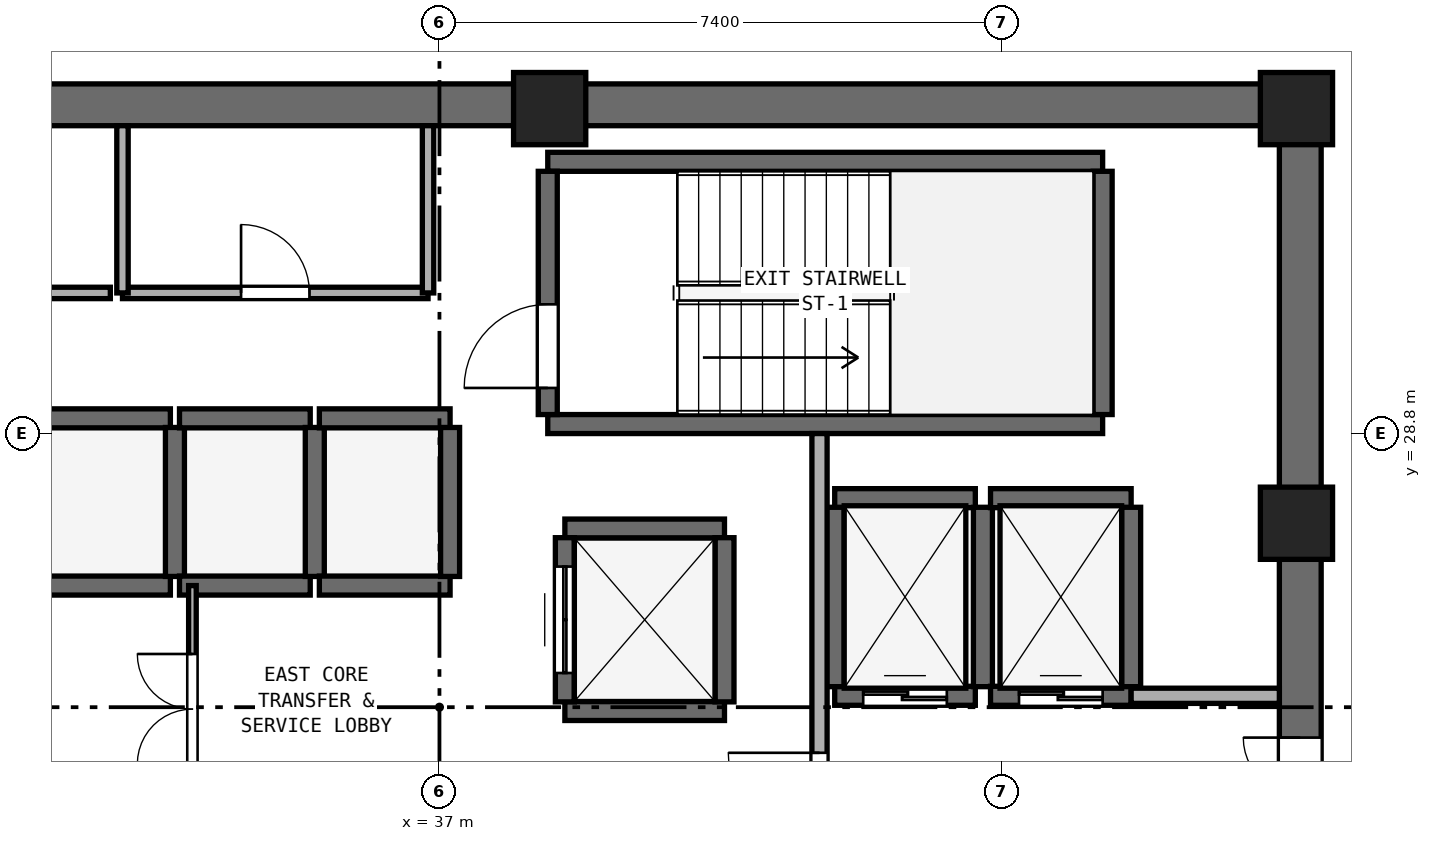
"""IFC4 building model, lengths in metres.
Left out: names, types, materials, properties, quantities, classifications, styles, units other than length and angle.
Written with IfcOpenShell. Run it as: python <this file> out.ifc"""

import sys

from ifc_helpers import new_model, si_unit, direction, frame, frame_2d, origin, origin_2d, place, context, subcontext, project, spatial, rectangle, extrude, element, fill, save


model = new_model("IFC4")
c1 = context("Model", 3, precision=1e-05, world=origin(), true_north=direction((0.0, 1.0)))
c2 = subcontext(c1, "Body", "Model", "MODEL_VIEW")
j1 = project(units=[si_unit("LENGTHUNIT", "METRE"), si_unit("PLANEANGLEUNIT", "RADIAN")], contexts=[c1])
p1 = place(None, origin())
s1 = spatial("IfcSite", under=j1, at=p1, CompositionType="ELEMENT")
p2 = place(p1, origin())
s2 = spatial("IfcBuilding", under=s1, at=p2, CompositionType="ELEMENT")
p3 = place(p2, frame((0.0, 0.0, 140.2)))
s3 = spatial("IfcBuildingStorey", under=s2, at=p3, CompositionType="ELEMENT", Elevation=140.2)
p4 = place(p3, frame((25.4, 33.125, 0.0), z_axis=(0.0, 0.0, 1.0), x_axis=(1.0, 0.0, 0.0)))
e1 = element("IfcWall", 1, at=p4, inside=s3, PredefinedType="SHEAR", context=c2, shape_type="SweptSolid", body=[
    extrude(rectangle(XDim=23.2, YDim=0.55, at=frame_2d((11.6, 0.0))), origin(), (0.0, 0.0, 1.0), 3.54),
])
p5 = place(p3, frame((48.325, 17.55, 0.0), z_axis=(0.0, 0.0, 1.0), x_axis=(0.0, 1.0, 0.0)))
e2 = element("IfcWall", 2, at=p5, inside=s3, PredefinedType="SHEAR", context=c2, shape_type="SweptSolid", body=[
    extrude(rectangle(XDim=15.3, YDim=0.55, at=frame_2d((7.65, 0.0))), origin(), (0.0, 0.0, 1.0), 3.54),
])
p6 = place(p5, frame((5.75, 0.0, 0.0)))
e3 = element("IfcOpeningElement", 3, at=p6, cuts=e2, PredefinedType="OPENING", context=c2, shape_type="SweptSolid", body=[
    extrude(rectangle(XDim=1.5, YDim=2.15, at=frame_2d((0.75, 1.075))), frame((0.0, 0.285, 0.0), z_axis=(0.0, -1.0, 0.0), x_axis=(1.0, 0.0, 0.0)), (0.0, 0.0, 1.0), 0.57),
])
for number, where, z_axis, x_axis in (
    (4, (48.275, 27.62, 0.0), (0.0, 0.0, 1.0), (1.0, 0.0, 0.0)),
    (5, (48.275, 33.075, 0.0), (0.0, 0.0, 1.0), (1.0, 0.0, 0.0)),
    (6, (38.45, 33.075, 0.0), (0.0, 0.0, 1.0), (1.0, 0.0, 0.0)),
):
    element("IfcColumn", number, at=place(p3, frame(where, z_axis=z_axis, x_axis=x_axis)), inside=s3, PredefinedType="PILASTER", context=c2, shape_type="SweptSolid", body=[
        extrude(rectangle(XDim=0.95, YDim=0.95, at=origin_2d()), origin(), (0.0, 0.0, 1.0), 3.8),
    ])
for number, where, z_axis, x_axis in (
    (7, (38.425, 28.925, 0.0), (0.0, 0.0, 1.0), (1.0, 0.0, 0.0)),
    (8, (38.425, 32.375, 0.0), (0.0, 0.0, 1.0), (1.0, 0.0, 0.0)),
):
    element("IfcWall", number, at=place(p3, frame(where, z_axis=z_axis, x_axis=x_axis)), inside=s3, PredefinedType="SHEAR", context=c2, shape_type="SweptSolid", body=[
        extrude(rectangle(XDim=7.3, YDim=0.25, at=frame_2d((3.65, 0.0))), origin(), (0.0, 0.0, 1.0), 3.54),
    ])
p7 = place(p3, frame((38.425, 29.05, 0.0), z_axis=(0.0, 0.0, 1.0), x_axis=(0.0, 1.0, 0.0)))
e9 = element("IfcWall", 9, at=p7, inside=s3, PredefinedType="SHEAR", context=c2, shape_type="SweptSolid", body=[
    extrude(rectangle(XDim=3.2, YDim=0.25, at=frame_2d((1.6, 0.0))), origin(), (0.0, 0.0, 1.0), 3.54),
])
p8 = place(p7, frame((0.35, 0.0, 0.0)))
e10 = element("IfcOpeningElement", 10, at=p8, cuts=e9, PredefinedType="OPENING", context=c2, shape_type="SweptSolid", body=[
    extrude(rectangle(XDim=1.1, YDim=2.15, at=frame_2d((0.55, 1.075))), frame((0.0, 0.135, 0.0), z_axis=(0.0, -1.0, 0.0), x_axis=(1.0, 0.0, 0.0)), (0.0, 0.0, 1.0), 0.27),
])
p9 = place(p3, frame((45.725, 29.05, 0.0), z_axis=(0.0, 0.0, 1.0), x_axis=(0.0, 1.0, 0.0)))
e11 = element("IfcWall", 11, at=p9, inside=s3, PredefinedType="SHEAR", context=c2, shape_type="SweptSolid", body=[
    extrude(rectangle(XDim=3.2, YDim=0.25, at=frame_2d((1.6, 0.0))), origin(), (0.0, 0.0, 1.0), 3.54),
])
for number, where, z_axis, x_axis in (
    (12, (31.74, 26.8, 0.0), (0.0, 0.0, 1.0), (1.0, 0.0, 0.0)),
    (13, (31.74, 29.0, 0.0), (0.0, 0.0, 1.0), (1.0, 0.0, 0.0)),
):
    element("IfcWall", number, at=place(p3, frame(where, z_axis=z_axis, x_axis=x_axis)), inside=s3, PredefinedType="SHEAR", context=c2, shape_type="SweptSolid", body=[
        extrude(rectangle(XDim=1.72, YDim=0.25, at=frame_2d((0.86, 0.0))), origin(), (0.0, 0.0, 1.0), 3.54),
    ])
p10 = place(p3, frame((33.52, 26.92, 0.0), z_axis=(0.0, 0.0, 1.0), x_axis=(0.0, 1.0, 0.0)))
e14 = element("IfcWall", 14, at=p10, inside=s3, PredefinedType="SHEAR", context=c2, shape_type="SweptSolid", body=[
    extrude(rectangle(XDim=1.96, YDim=0.25, at=frame_2d((0.98, 0.0))), origin(), (0.0, 0.0, 1.0), 3.54),
])
for number, where, z_axis, x_axis in (
    (15, (33.58, 26.8, 0.0), (0.0, 0.0, 1.0), (1.0, 0.0, 0.0)),
    (16, (33.58, 29.0, 0.0), (0.0, 0.0, 1.0), (1.0, 0.0, 0.0)),
):
    element("IfcWall", number, at=place(p3, frame(where, z_axis=z_axis, x_axis=x_axis)), inside=s3, PredefinedType="SHEAR", context=c2, shape_type="SweptSolid", body=[
        extrude(rectangle(XDim=1.72, YDim=0.25, at=frame_2d((0.86, 0.0))), origin(), (0.0, 0.0, 1.0), 3.54),
    ])
p11 = place(p3, frame((35.36, 26.92, 0.0), z_axis=(0.0, 0.0, 1.0), x_axis=(0.0, 1.0, 0.0)))
e17 = element("IfcWall", 17, at=p11, inside=s3, PredefinedType="SHEAR", context=c2, shape_type="SweptSolid", body=[
    extrude(rectangle(XDim=1.96, YDim=0.25, at=frame_2d((0.98, 0.0))), origin(), (0.0, 0.0, 1.0), 3.54),
])
for number, where, z_axis, x_axis in (
    (18, (35.42, 26.8, 0.0), (0.0, 0.0, 1.0), (1.0, 0.0, 0.0)),
    (19, (35.42, 29.0, 0.0), (0.0, 0.0, 1.0), (1.0, 0.0, 0.0)),
):
    element("IfcWall", number, at=place(p3, frame(where, z_axis=z_axis, x_axis=x_axis)), inside=s3, PredefinedType="SHEAR", context=c2, shape_type="SweptSolid", body=[
        extrude(rectangle(XDim=1.72, YDim=0.25, at=frame_2d((0.86, 0.0))), origin(), (0.0, 0.0, 1.0), 3.54),
    ])
p12 = place(p3, frame((37.14, 26.92, 0.0), z_axis=(0.0, 0.0, 1.0), x_axis=(0.0, 1.0, 0.0)))
e20 = element("IfcWall", 20, at=p12, inside=s3, PredefinedType="SHEAR", context=c2, shape_type="SweptSolid", body=[
    extrude(rectangle(XDim=1.96, YDim=0.25, at=frame_2d((0.98, 0.0))), origin(), (0.0, 0.0, 1.0), 3.54),
])
p13 = place(p3, frame((42.2, 25.35, 0.0), z_axis=(0.0, 0.0, 1.0), x_axis=(1.0, 0.0, 0.0)))
e21 = element("IfcWall", 21, at=p13, inside=s3, PredefinedType="SHEAR", context=c2, shape_type="SweptSolid", body=[
    extrude(rectangle(XDim=1.85, YDim=0.25, at=frame_2d((0.925, 0.0))), origin(), (0.0, 0.0, 1.0), 3.54),
])
p14 = place(p13, frame((0.375, 0.0, 0.0)))
e22 = element("IfcOpeningElement", 22, at=p14, cuts=e21, PredefinedType="OPENING", context=c2, shape_type="SweptSolid", body=[
    extrude(rectangle(XDim=1.1, YDim=2.15, at=frame_2d((0.55, 1.075))), frame((0.0, 0.135, 0.0), z_axis=(0.0, -1.0, 0.0), x_axis=(1.0, 0.0, 0.0)), (0.0, 0.0, 1.0), 0.27),
])
p15 = place(p3, frame((42.2, 27.95, 0.0), z_axis=(0.0, 0.0, 1.0), x_axis=(1.0, 0.0, 0.0)))
e23 = element("IfcWall", 23, at=p15, inside=s3, PredefinedType="SHEAR", context=c2, shape_type="SweptSolid", body=[
    extrude(rectangle(XDim=1.85, YDim=0.25, at=frame_2d((0.925, 0.0))), origin(), (0.0, 0.0, 1.0), 3.54),
])
for number, where, z_axis, x_axis in (
    (24, (42.2, 25.47, 0.0), (0.0, 0.0, 1.0), (0.0, 1.0, 0.0)),
    (25, (44.15, 25.47, 0.0), (0.0, 0.0, 1.0), (0.0, 1.0, 0.0)),
):
    element("IfcWall", number, at=place(p3, frame(where, z_axis=z_axis, x_axis=x_axis)), inside=s3, PredefinedType="SHEAR", context=c2, shape_type="SweptSolid", body=[
        extrude(rectangle(XDim=2.36, YDim=0.25, at=frame_2d((1.18, 0.0))), origin(), (0.0, 0.0, 1.0), 3.54),
    ])
p16 = place(p3, frame((44.25, 25.35, 0.0), z_axis=(0.0, 0.0, 1.0), x_axis=(1.0, 0.0, 0.0)))
e26 = element("IfcWall", 26, at=p16, inside=s3, PredefinedType="SHEAR", context=c2, shape_type="SweptSolid", body=[
    extrude(rectangle(XDim=1.85, YDim=0.25, at=frame_2d((0.925, 0.0))), origin(), (0.0, 0.0, 1.0), 3.54),
])
p17 = place(p16, frame((0.375, 0.0, 0.0)))
e27 = element("IfcOpeningElement", 27, at=p17, cuts=e26, PredefinedType="OPENING", context=c2, shape_type="SweptSolid", body=[
    extrude(rectangle(XDim=1.1, YDim=2.15, at=frame_2d((0.55, 1.075))), frame((0.0, 0.135, 0.0), z_axis=(0.0, -1.0, 0.0), x_axis=(1.0, 0.0, 0.0)), (0.0, 0.0, 1.0), 0.27),
])
p18 = place(p3, frame((44.25, 27.95, 0.0), z_axis=(0.0, 0.0, 1.0), x_axis=(1.0, 0.0, 0.0)))
e28 = element("IfcWall", 28, at=p18, inside=s3, PredefinedType="SHEAR", context=c2, shape_type="SweptSolid", body=[
    extrude(rectangle(XDim=1.85, YDim=0.25, at=frame_2d((0.925, 0.0))), origin(), (0.0, 0.0, 1.0), 3.54),
])
p19 = place(p3, frame((46.1, 25.47, 0.0), z_axis=(0.0, 0.0, 1.0), x_axis=(0.0, 1.0, 0.0)))
e29 = element("IfcWall", 29, at=p19, inside=s3, PredefinedType="SHEAR", context=c2, shape_type="SweptSolid", body=[
    extrude(rectangle(XDim=2.36, YDim=0.25, at=frame_2d((1.18, 0.0))), origin(), (0.0, 0.0, 1.0), 3.54),
])
for number, where, z_axis, x_axis in (
    (30, (38.65, 25.15, 0.0), (0.0, 0.0, 1.0), (1.0, 0.0, 0.0)),
    (31, (38.65, 27.55, 0.0), (0.0, 0.0, 1.0), (1.0, 0.0, 0.0)),
):
    element("IfcWall", number, at=place(p3, frame(where, z_axis=z_axis, x_axis=x_axis)), inside=s3, PredefinedType="SHEAR", context=c2, shape_type="SweptSolid", body=[
        extrude(rectangle(XDim=2.1, YDim=0.25, at=frame_2d((1.05, 0.0))), origin(), (0.0, 0.0, 1.0), 3.54),
    ])
p20 = place(p3, frame((38.65, 25.27, 0.0), z_axis=(0.0, 0.0, 1.0), x_axis=(0.0, 1.0, 0.0)))
e32 = element("IfcWall", 32, at=p20, inside=s3, PredefinedType="SHEAR", context=c2, shape_type="SweptSolid", body=[
    extrude(rectangle(XDim=2.16, YDim=0.25, at=frame_2d((1.08, 0.0))), origin(), (0.0, 0.0, 1.0), 3.54),
])
p21 = place(p20, frame((0.38, 0.0, 0.0)))
e33 = element("IfcOpeningElement", 33, at=p21, cuts=e32, PredefinedType="OPENING", context=c2, shape_type="SweptSolid", body=[
    extrude(rectangle(XDim=1.4, YDim=2.2, at=frame_2d((0.7, 1.1))), frame((0.0, 0.135, 0.0), z_axis=(0.0, -1.0, 0.0), x_axis=(1.0, 0.0, 0.0)), (0.0, 0.0, 1.0), 0.27),
])
p22 = place(p3, frame((40.75, 25.27, 0.0), z_axis=(0.0, 0.0, 1.0), x_axis=(0.0, 1.0, 0.0)))
e34 = element("IfcWall", 34, at=p22, inside=s3, PredefinedType="SHEAR", context=c2, shape_type="SweptSolid", body=[
    extrude(rectangle(XDim=2.16, YDim=0.25, at=frame_2d((1.08, 0.0))), origin(), (0.0, 0.0, 1.0), 3.54),
])
p23 = place(p3, frame((42.0, 22.75, 0.0), z_axis=(0.0, 0.0, 1.0), x_axis=(0.0, 1.0, 0.0)))
e35 = element("IfcWall", 35, at=p23, inside=s3, PredefinedType="SOLIDWALL", context=c2, shape_type="SweptSolid", body=[
    extrude(rectangle(XDim=6.05, YDim=0.2, at=frame_2d((3.025, 0.0))), origin(), (0.0, 0.0, 1.0), 3.54),
])
p24 = place(p23, frame((0.65, 0.0, 0.0)))
e36 = element("IfcOpeningElement", 36, at=p24, cuts=e35, PredefinedType="OPENING", context=c2, shape_type="SweptSolid", body=[
    extrude(rectangle(XDim=1.2, YDim=2.15, at=frame_2d((0.6, 1.075))), frame((0.0, 0.11, 0.0), z_axis=(0.0, -1.0, 0.0), x_axis=(1.0, 0.0, 0.0)), (0.0, 0.0, 1.0), 0.22),
])
p25 = place(p3, frame((46.1, 25.35, 0.0), z_axis=(0.0, 0.0, 1.0), x_axis=(1.0, 0.0, 0.0)))
e37 = element("IfcWall", 37, at=p25, inside=s3, PredefinedType="SOLIDWALL", context=c2, shape_type="SweptSolid", body=[
    extrude(rectangle(XDim=1.95, YDim=0.2, at=frame_2d((0.975, 0.0))), origin(), (0.0, 0.0, 1.0), 3.54),
])
p26 = place(p3, frame((29.43, 30.65, 0.0), z_axis=(0.0, 0.0, 1.0), x_axis=(1.0, 0.0, 0.0)))
e38 = element("IfcWall", 38, at=p26, inside=s3, PredefinedType="PARTITIONING", context=c2, shape_type="SweptSolid", body=[
    extrude(rectangle(XDim=3.24, YDim=0.15, at=frame_2d((1.62, 0.0))), origin(), (0.0, 0.0, 1.0), 3.54),
])
p27 = place(p26, frame((1.145, 0.0, 0.0)))
e39 = element("IfcOpeningElement", 39, at=p27, cuts=e38, PredefinedType="OPENING", context=c2, shape_type="SweptSolid", body=[
    extrude(rectangle(XDim=0.95, YDim=2.1, at=frame_2d((0.475, 1.05))), frame((0.0, 0.085, 0.0), z_axis=(0.0, -1.0, 0.0), x_axis=(1.0, 0.0, 0.0)), (0.0, 0.0, 1.0), 0.17),
])
p28 = place(p3, frame((32.83, 30.65, 0.0), z_axis=(0.0, 0.0, 1.0), x_axis=(1.0, 0.0, 0.0)))
e40 = element("IfcWall", 40, at=p28, inside=s3, PredefinedType="PARTITIONING", context=c2, shape_type="SweptSolid", body=[
    extrude(rectangle(XDim=4.02, YDim=0.15, at=frame_2d((2.01, 0.0))), origin(), (0.0, 0.0, 1.0), 3.54),
])
p29 = place(p28, frame((1.56, 0.0, 0.0)))
e41 = element("IfcOpeningElement", 41, at=p29, cuts=e40, PredefinedType="OPENING", context=c2, shape_type="SweptSolid", body=[
    extrude(rectangle(XDim=0.9, YDim=2.1, at=frame_2d((0.45, 1.05))), frame((0.0, 0.085, 0.0), z_axis=(0.0, -1.0, 0.0), x_axis=(1.0, 0.0, 0.0)), (0.0, 0.0, 1.0), 0.17),
])
for number, where, z_axis, x_axis in (
    (42, (32.83, 30.65, 0.0), (0.0, 0.0, 1.0), (0.0, 1.0, 0.0)),
    (43, (36.85, 30.65, 0.0), (0.0, 0.0, 1.0), (0.0, 1.0, 0.0)),
):
    element("IfcWall", number, at=place(p3, frame(where, z_axis=z_axis, x_axis=x_axis)), inside=s3, PredefinedType="PARTITIONING", context=c2, shape_type="SweptSolid", body=[
        extrude(rectangle(XDim=2.2, YDim=0.15, at=frame_2d((1.1, 0.0))), origin(), (0.0, 0.0, 1.0), 3.54),
    ])
p30 = place(p3, frame((33.75, 23.6, 0.0), z_axis=(0.0, 0.0, 1.0), x_axis=(0.0, 1.0, 0.0)))
e44 = element("IfcWall", 44, at=p30, inside=s3, PredefinedType="PARTITIONING", context=c2, shape_type="SweptSolid", body=[
    extrude(rectangle(XDim=3.2, YDim=0.1, at=frame_2d((1.6, 0.0))), origin(), (0.0, 0.0, 1.0), 3.54),
])
p31 = place(p30, frame((0.85, 0.0, 0.0)))
e45 = element("IfcOpeningElement", 45, at=p31, cuts=e44, PredefinedType="OPENING", context=c2, shape_type="SweptSolid", body=[
    extrude(rectangle(XDim=1.45, YDim=2.12, at=frame_2d((0.725, 1.06))), frame((0.0, 0.06, 0.0), z_axis=(0.0, -1.0, 0.0), x_axis=(1.0, 0.0, 0.0)), (0.0, 0.0, 1.0), 0.12),
])
p32 = place(p8, origin())
e46 = element("IfcDoor", 46, at=p32, inside=s3, OperationType="SINGLE_SWING_LEFT", PredefinedType="DOOR", context=c2, shape_type="SweptSolid", body=[
    extrude(rectangle(XDim=1.1, YDim=2.15, at=frame_2d((0.55, 1.075))), frame((0.0, 0.025, 0.0), z_axis=(0.0, -1.0, 0.0), x_axis=(1.0, 0.0, 0.0)), (0.0, 0.0, 1.0), 0.05),
])
fill(e10, e46)
p33 = place(p14, origin())
e47 = element("IfcDoor", 47, at=p33, inside=s3, OperationType="DOUBLE_DOOR_SLIDING", PredefinedType="DOOR", context=c2, shape_type="SweptSolid", body=[
    extrude(rectangle(XDim=1.1, YDim=2.15, at=frame_2d((0.55, 1.075))), frame((0.0, 0.025, 0.0), z_axis=(0.0, -1.0, 0.0), x_axis=(1.0, 0.0, 0.0)), (0.0, 0.0, 1.0), 0.05),
])
fill(e22, e47)
p34 = place(p17, origin())
e48 = element("IfcDoor", 48, at=p34, inside=s3, OperationType="DOUBLE_DOOR_SLIDING", PredefinedType="DOOR", context=c2, shape_type="SweptSolid", body=[
    extrude(rectangle(XDim=1.1, YDim=2.15, at=frame_2d((0.55, 1.075))), frame((0.0, 0.025, 0.0), z_axis=(0.0, -1.0, 0.0), x_axis=(1.0, 0.0, 0.0)), (0.0, 0.0, 1.0), 0.05),
])
fill(e27, e48)
p35 = place(p21, origin())
e49 = element("IfcDoor", 49, at=p35, inside=s3, OperationType="DOUBLE_DOOR_SLIDING", PredefinedType="DOOR", context=c2, shape_type="SweptSolid", body=[
    extrude(rectangle(XDim=1.4, YDim=2.2, at=frame_2d((0.7, 1.1))), frame((0.0, 0.025, 0.0), z_axis=(0.0, -1.0, 0.0), x_axis=(1.0, 0.0, 0.0)), (0.0, 0.0, 1.0), 0.05),
])
fill(e33, e49)
p36 = place(p24, origin())
e50 = element("IfcDoor", 50, at=p36, inside=s3, OperationType="SINGLE_SWING_RIGHT", PredefinedType="DOOR", context=c2, shape_type="SweptSolid", body=[
    extrude(rectangle(XDim=1.2, YDim=2.15, at=frame_2d((0.6, 1.075))), frame((0.0, 0.025, 0.0), z_axis=(0.0, -1.0, 0.0), x_axis=(1.0, 0.0, 0.0)), (0.0, 0.0, 1.0), 0.05),
])
fill(e36, e50)
p37 = place(p6, origin())
e51 = element("IfcDoor", 51, at=p37, inside=s3, OperationType="DOUBLE_DOOR_SINGLE_SWING", PredefinedType="DOOR", context=c2, shape_type="SweptSolid", body=[
    extrude(rectangle(XDim=1.5, YDim=2.15, at=frame_2d((0.75, 1.075))), frame((0.0, 0.025, 0.0), z_axis=(0.0, -1.0, 0.0), x_axis=(1.0, 0.0, 0.0)), (0.0, 0.0, 1.0), 0.05),
])
fill(e3, e51)
p38 = place(p29, origin())
e52 = element("IfcDoor", 52, at=p38, inside=s3, OperationType="SINGLE_SWING_LEFT", PredefinedType="DOOR", context=c2, shape_type="SweptSolid", body=[
    extrude(rectangle(XDim=0.9, YDim=2.1, at=frame_2d((0.45, 1.05))), frame((0.0, 0.025, 0.0), z_axis=(0.0, -1.0, 0.0), x_axis=(1.0, 0.0, 0.0)), (0.0, 0.0, 1.0), 0.05),
])
fill(e41, e52)
p39 = place(p31, origin())
e53 = element("IfcDoor", 53, at=p39, inside=s3, OperationType="DOUBLE_DOOR_SINGLE_SWING", PredefinedType="DOOR", context=c2, shape_type="SweptSolid", body=[
    extrude(rectangle(XDim=1.45, YDim=2.12, at=frame_2d((0.725, 1.06))), frame((0.0, 0.025, 0.0), z_axis=(0.0, -1.0, 0.0), x_axis=(1.0, 0.0, 0.0)), (0.0, 0.0, 1.0), 0.05),
])
fill(e45, e53)
save(model, sys.argv[1])
